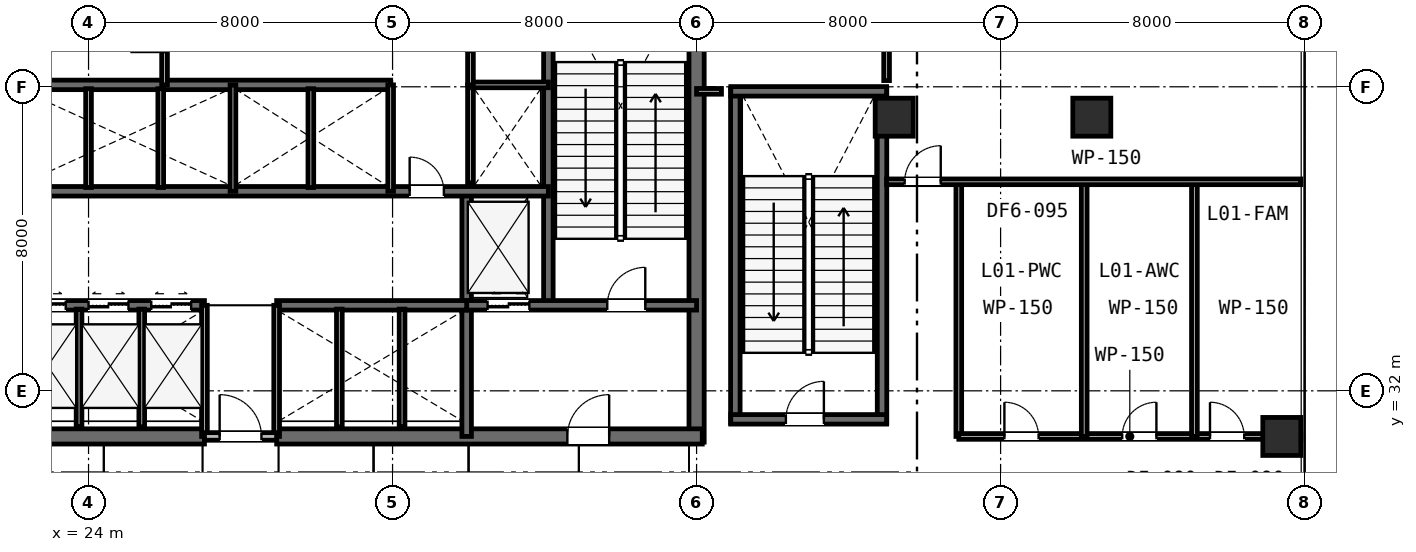
"""IFC4 building model, lengths in metres.
Left out: names, types, materials, properties, quantities, classifications, styles, units other than length and angle.
Written with IfcOpenShell. Run it as: python <this file> out.ifc"""

import sys

from ifc_helpers import new_model, si_unit, direction, frame, frame_2d, origin, origin_2d, place, context, subcontext, project, spatial, rectangle, extrude, element, fill, save


model = new_model("IFC4")
c1 = context("Model", 3, precision=1e-05, world=origin(), true_north=direction((0.0, 1.0)))
c2 = subcontext(c1, "Body", "Model", "MODEL_VIEW")
j1 = project(units=[si_unit("LENGTHUNIT", "METRE"), si_unit("PLANEANGLEUNIT", "RADIAN")], contexts=[c1])
p1 = place(None, origin())
s1 = spatial("IfcSite", under=j1, at=p1, CompositionType="ELEMENT")
p2 = place(p1, origin())
s2 = spatial("IfcBuilding", under=s1, at=p2, CompositionType="ELEMENT")
p3 = place(p2, frame((0.0, 0.0, 6.0)))
s3 = spatial("IfcBuildingStorey", under=s2, at=p3, CompositionType="ELEMENT", Elevation=6.0)
p4 = place(p3, frame((40.0, 30.65, 0.0), z_axis=(0.0, 0.0, 1.0), x_axis=(0.0, 1.0, 0.0)))
e1 = element("IfcWall", 1, at=p4, inside=s3, PredefinedType="SHEAR", context=c2, shape_type="SweptSolid", body=[
    extrude(rectangle(XDim=12.3, YDim=0.4, at=frame_2d((6.15, 0.0))), origin(), (0.0, 0.0, 1.0), 5.1),
])
p5 = place(p3, frame((15.85, 30.8, 0.0), z_axis=(0.0, 0.0, 1.0), x_axis=(1.0, 0.0, 0.0)))
e2 = element("IfcWall", 2, at=p5, inside=s3, PredefinedType="SHEAR", context=c2, shape_type="SweptSolid", body=[
    extrude(rectangle(XDim=11.2, YDim=0.4, at=frame_2d((5.6, 0.0))), origin(), (0.0, 0.0, 1.0), 5.1),
])
p6 = place(p5, frame((2.45, 0.0, 0.0)))
e3 = element("IfcOpeningElement", 3, at=p6, cuts=e2, PredefinedType="OPENING", context=c2, shape_type="SweptSolid", body=[
    extrude(rectangle(XDim=1.1, YDim=2.15, at=frame_2d((0.55, 1.075))), frame((0.0, 0.21, 0.0), z_axis=(0.0, -1.0, 0.0), x_axis=(1.0, 0.0, 0.0)), (0.0, 0.0, 1.0), 0.42),
])
p7 = place(p3, frame((28.95, 30.8, 0.0), z_axis=(0.0, 0.0, 1.0), x_axis=(1.0, 0.0, 0.0)))
e4 = element("IfcWall", 4, at=p7, inside=s3, PredefinedType="SHEAR", context=c2, shape_type="SweptSolid", body=[
    extrude(rectangle(XDim=11.2, YDim=0.4, at=frame_2d((5.6, 0.0))), origin(), (0.0, 0.0, 1.0), 5.1),
])
p8 = place(p7, frame((7.65, 0.0, 0.0)))
e5 = element("IfcOpeningElement", 5, at=p8, cuts=e4, PredefinedType="OPENING", context=c2, shape_type="SweptSolid", body=[
    extrude(rectangle(XDim=1.1, YDim=2.15, at=frame_2d((0.55, 1.075))), frame((0.0, 0.21, 0.0), z_axis=(0.0, -1.0, 0.0), x_axis=(1.0, 0.0, 0.0)), (0.0, 0.0, 1.0), 0.42),
])
p9 = place(p3, frame((36.1, 34.25, 0.0), z_axis=(0.0, 0.0, 1.0), x_axis=(0.0, 1.0, 0.0)))
e6 = element("IfcWall", 6, at=p9, inside=s3, PredefinedType="SHEAR", context=c2, shape_type="SweptSolid", body=[
    extrude(rectangle(XDim=8.65, YDim=0.25, at=frame_2d((4.325, 0.0))), origin(), (0.0, 0.0, 1.0), 5.1),
])
p10 = place(p3, frame((33.95, 30.8, 0.0), z_axis=(0.0, 0.0, 1.0), x_axis=(0.0, 1.0, 0.0)))
e7 = element("IfcWall", 7, at=p10, inside=s3, PredefinedType="SHEAR", context=c2, shape_type="SweptSolid", body=[
    extrude(rectangle(XDim=6.45, YDim=0.25, at=frame_2d((3.225, 0.0))), origin(), (0.0, 0.0, 1.0), 5.1),
])
p11 = place(p3, frame((33.95, 34.25, 0.0), z_axis=(0.0, 0.0, 1.0), x_axis=(1.0, 0.0, 0.0)))
e8 = element("IfcWall", 8, at=p11, inside=s3, PredefinedType="SHEAR", context=c2, shape_type="SweptSolid", body=[
    extrude(rectangle(XDim=6.05, YDim=0.25, at=frame_2d((3.025, 0.0))), origin(), (0.0, 0.0, 1.0), 5.1),
])
p12 = place(p11, frame((3.7, 0.0, 0.0)))
e9 = element("IfcOpeningElement", 9, at=p12, cuts=e8, PredefinedType="OPENING", context=c2, shape_type="SweptSolid", body=[
    extrude(rectangle(XDim=1.0, YDim=2.15, at=frame_2d((0.5, 1.075))), frame((0.0, 0.135, 0.0), z_axis=(0.0, -1.0, 0.0), x_axis=(1.0, 0.0, 0.0)), (0.0, 0.0, 1.0), 0.27),
])
p13 = place(p11, frame((0.55, 0.0, 0.0)))
e10 = element("IfcOpeningElement", 10, at=p13, cuts=e8, PredefinedType="OPENING", context=c2, shape_type="SweptSolid", body=[
    extrude(rectangle(XDim=1.1, YDim=2.15, at=frame_2d((0.55, 1.075))), frame((0.0, 0.135, 0.0), z_axis=(0.0, -1.0, 0.0), x_axis=(1.0, 0.0, 0.0)), (0.0, 0.0, 1.0), 0.27),
])
p14 = place(p3, frame((22.05, 34.25, 0.0), z_axis=(0.0, 0.0, 1.0), x_axis=(1.0, 0.0, 0.0)))
e11 = element("IfcWall", 11, at=p14, inside=s3, PredefinedType="SHEAR", context=c2, shape_type="SweptSolid", body=[
    extrude(rectangle(XDim=5.0, YDim=0.25, at=frame_2d((2.5, 0.0))), origin(), (0.0, 0.0, 1.0), 5.1),
])
p15 = place(p14, frame((0.3, 0.0, 0.0)))
e12 = element("IfcOpeningElement", 12, at=p15, cuts=e11, PredefinedType="OPENING", context=c2, shape_type="SweptSolid", body=[
    extrude(rectangle(XDim=1.05, YDim=2.15, at=frame_2d((0.525, 1.075))), frame((0.0, 0.135, 0.0), z_axis=(0.0, -1.0, 0.0), x_axis=(1.0, 0.0, 0.0)), (0.0, 0.0, 1.0), 0.27),
])
p16 = place(p14, frame((1.95, 0.0, 0.0)))
e13 = element("IfcOpeningElement", 13, at=p16, cuts=e11, PredefinedType="OPENING", context=c2, shape_type="SweptSolid", body=[
    extrude(rectangle(XDim=1.05, YDim=2.15, at=frame_2d((0.525, 1.075))), frame((0.0, 0.135, 0.0), z_axis=(0.0, -1.0, 0.0), x_axis=(1.0, 0.0, 0.0)), (0.0, 0.0, 1.0), 0.27),
])
p17 = place(p14, frame((3.6, 0.0, 0.0)))
e14 = element("IfcOpeningElement", 14, at=p17, cuts=e11, PredefinedType="OPENING", context=c2, shape_type="SweptSolid", body=[
    extrude(rectangle(XDim=1.05, YDim=2.15, at=frame_2d((0.525, 1.075))), frame((0.0, 0.135, 0.0), z_axis=(0.0, -1.0, 0.0), x_axis=(1.0, 0.0, 0.0)), (0.0, 0.0, 1.0), 0.27),
])
p18 = place(p3, frame((28.95, 34.25, 0.0), z_axis=(0.0, 0.0, 1.0), x_axis=(1.0, 0.0, 0.0)))
e15 = element("IfcWall", 15, at=p18, inside=s3, PredefinedType="SHEAR", context=c2, shape_type="SweptSolid", body=[
    extrude(rectangle(XDim=5.0, YDim=0.25, at=frame_2d((2.5, 0.0))), origin(), (0.0, 0.0, 1.0), 5.1),
])
p19 = place(p3, frame((19.9, 37.25, 0.0), z_axis=(0.0, 0.0, 1.0), x_axis=(1.0, 0.0, 0.0)))
e16 = element("IfcWall", 16, at=p19, inside=s3, PredefinedType="SHEAR", context=c2, shape_type="SweptSolid", body=[
    extrude(rectangle(XDim=16.2, YDim=0.25, at=frame_2d((8.1, 0.0))), origin(), (0.0, 0.0, 1.0), 5.1),
])
p20 = place(p19, frame((12.55, 0.0, 0.0)))
e17 = element("IfcOpeningElement", 17, at=p20, cuts=e16, PredefinedType="OPENING", context=c2, shape_type="SweptSolid", body=[
    extrude(rectangle(XDim=0.9, YDim=2.15, at=frame_2d((0.45, 1.075))), frame((0.0, 0.135, 0.0), z_axis=(0.0, -1.0, 0.0), x_axis=(1.0, 0.0, 0.0)), (0.0, 0.0, 1.0), 0.27),
])
p21 = place(p3, frame((19.9, 40.05, 0.0), z_axis=(0.0, 0.0, 1.0), x_axis=(1.0, 0.0, 0.0)))
e18 = element("IfcWall", 18, at=p21, inside=s3, PredefinedType="SHEAR", context=c2, shape_type="SweptSolid", body=[
    extrude(rectangle(XDim=12.05, YDim=0.25, at=frame_2d((6.025, 0.0))), origin(), (0.0, 0.0, 1.0), 5.1),
])
for number, where, z_axis, x_axis in (
    (19, (41.02, 31.15, 0.0), (0.0, 0.0, 1.0), (0.0, 1.0, 0.0)),
    (20, (44.88, 31.15, 0.0), (0.0, 0.0, 1.0), (0.0, 1.0, 0.0)),
):
    element("IfcWall", number, at=place(p3, frame(where, z_axis=z_axis, x_axis=x_axis)), inside=s3, PredefinedType="SHEAR", context=c2, shape_type="SweptSolid", body=[
        extrude(rectangle(XDim=8.8, YDim=0.25, at=frame_2d((4.4, 0.0))), origin(), (0.0, 0.0, 1.0), 5.1),
    ])
p22 = place(p3, frame((40.9, 39.88, 0.0), z_axis=(0.0, 0.0, 1.0), x_axis=(1.0, 0.0, 0.0)))
e21 = element("IfcWall", 21, at=p22, inside=s3, PredefinedType="SHEAR", context=c2, shape_type="SweptSolid", body=[
    extrude(rectangle(XDim=4.1, YDim=0.25, at=frame_2d((2.05, 0.0))), origin(), (0.0, 0.0, 1.0), 5.1),
])
p23 = place(p3, frame((40.9, 31.25, 0.0), z_axis=(0.0, 0.0, 1.0), x_axis=(1.0, 0.0, 0.0)))
e22 = element("IfcWall", 22, at=p23, inside=s3, PredefinedType="SHEAR", context=c2, shape_type="SweptSolid", body=[
    extrude(rectangle(XDim=4.1, YDim=0.25, at=frame_2d((2.05, 0.0))), origin(), (0.0, 0.0, 1.0), 5.1),
])
p24 = place(p23, frame((1.45, 0.0, 0.0)))
e23 = element("IfcOpeningElement", 23, at=p24, cuts=e22, PredefinedType="OPENING", context=c2, shape_type="SweptSolid", body=[
    extrude(rectangle(XDim=1.0, YDim=2.15, at=frame_2d((0.5, 1.075))), frame((0.0, 0.135, 0.0), z_axis=(0.0, -1.0, 0.0), x_axis=(1.0, 0.0, 0.0)), (0.0, 0.0, 1.0), 0.27),
])
for number, where, z_axis, x_axis in (
    (24, (45.2, 39.2, 0.0), (0.0, 0.0, 1.0), (1.0, 0.0, 0.0)),
    (25, (50.4, 39.2, 0.0), (0.0, 0.0, 1.0), (1.0, 0.0, 0.0)),
    (26, (55.4, 30.8, 0.0), (0.0, 0.0, 1.0), (1.0, 0.0, 0.0)),
):
    element("IfcColumn", number, at=place(p3, frame(where, z_axis=z_axis, x_axis=x_axis)), inside=s3, PredefinedType="COLUMN", context=c2, shape_type="SweptSolid", body=[
        extrude(rectangle(XDim=1.0, YDim=1.0, at=origin_2d()), origin(), (0.0, 0.0, 1.0), 5.1),
    ])
for number, where, z_axis, x_axis in (
    (27, (27.05, 30.8, 0.0), (0.0, 0.0, 1.0), (0.0, 1.0, 0.0)),
    (28, (28.95, 30.8, 0.0), (0.0, 0.0, 1.0), (0.0, 1.0, 0.0)),
):
    element("IfcWall", number, at=place(p3, frame(where, z_axis=z_axis, x_axis=x_axis)), inside=s3, PredefinedType="PLUMBINGWALL", context=c2, shape_type="SweptSolid", body=[
        extrude(rectangle(XDim=3.45, YDim=0.15, at=frame_2d((1.725, 0.0))), origin(), (0.0, 0.0, 1.0), 4.51),
    ])
p25 = place(p3, frame((27.05, 30.8, 0.0), z_axis=(0.0, 0.0, 1.0), x_axis=(1.0, 0.0, 0.0)))
e29 = element("IfcWall", 29, at=p25, inside=s3, PredefinedType="PARTITIONING", context=c2, shape_type="SweptSolid", body=[
    extrude(rectangle(XDim=1.9, YDim=0.2, at=frame_2d((0.95, 0.0))), origin(), (0.0, 0.0, 1.0), 4.51),
])
p26 = place(p25, frame((0.4, 0.0, 0.0)))
e30 = element("IfcOpeningElement", 30, at=p26, cuts=e29, PredefinedType="OPENING", context=c2, shape_type="SweptSolid", body=[
    extrude(rectangle(XDim=1.1, YDim=2.15, at=frame_2d((0.55, 1.075))), frame((0.0, 0.11, 0.0), z_axis=(0.0, -1.0, 0.0), x_axis=(1.0, 0.0, 0.0)), (0.0, 0.0, 1.0), 0.22),
])
for number, where, z_axis, x_axis in (
    (31, (23.75, 31.05, 0.0), (0.0, 0.0, 1.0), (0.0, 1.0, 0.0)),
    (32, (25.4, 31.05, 0.0), (0.0, 0.0, 1.0), (0.0, 1.0, 0.0)),
    (33, (30.6, 31.05, 0.0), (0.0, 0.0, 1.0), (0.0, 1.0, 0.0)),
    (34, (32.25, 31.05, 0.0), (0.0, 0.0, 1.0), (0.0, 1.0, 0.0)),
):
    element("IfcWall", number, at=place(p3, frame(where, z_axis=z_axis, x_axis=x_axis)), inside=s3, PredefinedType="PLUMBINGWALL", context=c2, shape_type="SweptSolid", body=[
        extrude(rectangle(XDim=3.1, YDim=0.15, at=frame_2d((1.55, 0.0))), origin(), (0.0, 0.0, 1.0), 4.77),
    ])
p27 = place(p3, frame((27.8, 37.25, 0.0), z_axis=(0.0, 0.0, 1.0), x_axis=(0.0, 1.0, 0.0)))
e35 = element("IfcWall", 35, at=p27, inside=s3, PredefinedType="PLUMBINGWALL", context=c2, shape_type="SweptSolid", body=[
    extrude(rectangle(XDim=2.8, YDim=0.15, at=frame_2d((1.4, 0.0))), origin(), (0.0, 0.0, 1.0), 4.77),
])
for number, where, z_axis, x_axis in (
    (36, (24.0, 37.35, 0.0), (0.0, 0.0, 1.0), (0.0, 1.0, 0.0)),
    (37, (25.9, 37.35, 0.0), (0.0, 0.0, 1.0), (0.0, 1.0, 0.0)),
):
    element("IfcWall", number, at=place(p3, frame(where, z_axis=z_axis, x_axis=x_axis)), inside=s3, PredefinedType="PLUMBINGWALL", context=c2, shape_type="SweptSolid", body=[
        extrude(rectangle(XDim=2.6, YDim=0.15, at=frame_2d((1.3, 0.0))), origin(), (0.0, 0.0, 1.0), 4.77),
    ])
p28 = place(p3, frame((31.95, 37.25, 0.0), z_axis=(0.0, 0.0, 1.0), x_axis=(0.0, 1.0, 0.0)))
e38 = element("IfcWall", 38, at=p28, inside=s3, PredefinedType="PLUMBINGWALL", context=c2, shape_type="SweptSolid", body=[
    extrude(rectangle(XDim=2.8, YDim=0.15, at=frame_2d((1.4, 0.0))), origin(), (0.0, 0.0, 1.0), 4.77),
])
p29 = place(p3, frame((29.85, 37.35, 0.0), z_axis=(0.0, 0.0, 1.0), x_axis=(0.0, 1.0, 0.0)))
e39 = element("IfcWall", 39, at=p29, inside=s3, PredefinedType="PLUMBINGWALL", context=c2, shape_type="SweptSolid", body=[
    extrude(rectangle(XDim=2.6, YDim=0.15, at=frame_2d((1.3, 0.0))), origin(), (0.0, 0.0, 1.0), 4.77),
])
p30 = place(p3, frame((34.05, 37.473, 0.0), z_axis=(0.0, 0.0, 1.0), x_axis=(0.0, 1.0, 0.0)))
e40 = element("IfcWall", 40, at=p30, inside=s3, PredefinedType="PLUMBINGWALL", context=c2, shape_type="SweptSolid", body=[
    extrude(rectangle(XDim=2.577, YDim=0.15, at=frame_2d((1.288, 0.0))), origin(), (0.0, 0.0, 1.0), 4.77),
])
p31 = place(p3, frame((34.05, 40.05, 0.0), z_axis=(0.0, 0.0, 1.0), x_axis=(1.0, 0.0, 0.0)))
e41 = element("IfcWall", 41, at=p31, inside=s3, PredefinedType="PARTITIONING", context=c2, shape_type="SweptSolid", body=[
    extrude(rectangle(XDim=2.05, YDim=0.15, at=frame_2d((1.025, 0.0))), origin(), (0.0, 0.0, 1.0), 4.77),
])
p32 = place(p3, frame((34.05, 40.05, 0.0), z_axis=(0.0, 0.0, 1.0), x_axis=(0.0, 1.0, 0.0)))
e42 = element("IfcWall", 42, at=p32, inside=s3, PredefinedType="PARTITIONING", context=c2, shape_type="SweptSolid", body=[
    extrude(rectangle(XDim=2.63, YDim=0.15, at=frame_2d((1.315, 0.0))), origin(), (0.0, 0.0, 1.0), 4.77),
])
p33 = place(p32, frame((0.865, 0.0, 0.0)))
e43 = element("IfcOpeningElement", 43, at=p33, cuts=e42, PredefinedType="OPENING", context=c2, shape_type="SweptSolid", body=[
    extrude(rectangle(XDim=0.9, YDim=2.15, at=frame_2d((0.45, 1.075))), frame((0.0, 0.085, 0.0), z_axis=(0.0, -1.0, 0.0), x_axis=(1.0, 0.0, 0.0)), (0.0, 0.0, 1.0), 0.17),
])
p34 = place(p3, frame((26.0, 40.05, 0.0), z_axis=(0.0, 0.0, 1.0), x_axis=(0.0, 1.0, 0.0)))
e44 = element("IfcWall", 44, at=p34, inside=s3, PredefinedType="PARTITIONING", context=c2, shape_type="SweptSolid", body=[
    extrude(rectangle(XDim=2.63, YDim=0.15, at=frame_2d((1.315, 0.0))), origin(), (0.0, 0.0, 1.0), 4.77),
])
p35 = place(p34, frame((0.865, 0.0, 0.0)))
e45 = element("IfcOpeningElement", 45, at=p35, cuts=e44, PredefinedType="OPENING", context=c2, shape_type="SweptSolid", body=[
    extrude(rectangle(XDim=0.9, YDim=2.15, at=frame_2d((0.45, 1.075))), frame((0.0, 0.085, 0.0), z_axis=(0.0, -1.0, 0.0), x_axis=(1.0, 0.0, 0.0)), (0.0, 0.0, 1.0), 0.17),
])
p36 = place(p3, frame((46.9, 30.8, 0.0), z_axis=(0.0, 0.0, 1.0), x_axis=(0.0, 1.0, 0.0)))
e46 = element("IfcWall", 46, at=p36, inside=s3, PredefinedType="PARTITIONING", context=c2, shape_type="SweptSolid", body=[
    extrude(rectangle(XDim=6.7, YDim=0.15, at=frame_2d((3.35, 0.0))), origin(), (0.0, 0.0, 1.0), 4.12),
])
p37 = place(p3, frame((46.9, 30.8, 0.0), z_axis=(0.0, 0.0, 1.0), x_axis=(1.0, 0.0, 0.0)))
e47 = element("IfcWall", 47, at=p37, inside=s3, PredefinedType="PARTITIONING", context=c2, shape_type="SweptSolid", body=[
    extrude(rectangle(XDim=9.0, YDim=0.15, at=frame_2d((4.5, 0.0))), origin(), (0.0, 0.0, 1.0), 4.12),
])
p38 = place(p37, frame((1.2, 0.0, 0.0)))
e48 = element("IfcOpeningElement", 48, at=p38, cuts=e47, PredefinedType="OPENING", context=c2, shape_type="SweptSolid", body=[
    extrude(rectangle(XDim=0.9, YDim=2.15, at=frame_2d((0.45, 1.075))), frame((0.0, 0.085, 0.0), z_axis=(0.0, -1.0, 0.0), x_axis=(1.0, 0.0, 0.0)), (0.0, 0.0, 1.0), 0.17),
])
p39 = place(p37, frame((4.3, 0.0, 0.0)))
e49 = element("IfcOpeningElement", 49, at=p39, cuts=e47, PredefinedType="OPENING", context=c2, shape_type="SweptSolid", body=[
    extrude(rectangle(XDim=0.9, YDim=2.15, at=frame_2d((0.45, 1.075))), frame((0.0, 0.085, 0.0), z_axis=(0.0, -1.0, 0.0), x_axis=(1.0, 0.0, 0.0)), (0.0, 0.0, 1.0), 0.17),
])
p40 = place(p37, frame((6.61, 0.0, 0.0)))
e50 = element("IfcOpeningElement", 50, at=p40, cuts=e47, PredefinedType="OPENING", context=c2, shape_type="SweptSolid", body=[
    extrude(rectangle(XDim=0.9, YDim=2.15, at=frame_2d((0.45, 1.075))), frame((0.0, 0.085, 0.0), z_axis=(0.0, -1.0, 0.0), x_axis=(1.0, 0.0, 0.0)), (0.0, 0.0, 1.0), 0.17),
])
for number, where, z_axis, x_axis in (
    (51, (50.2, 30.8, 0.0), (0.0, 0.0, 1.0), (0.0, 1.0, 0.0)),
    (52, (53.1, 30.8, 0.0), (0.0, 0.0, 1.0), (0.0, 1.0, 0.0)),
):
    element("IfcWall", number, at=place(p3, frame(where, z_axis=z_axis, x_axis=x_axis)), inside=s3, PredefinedType="PARTITIONING", context=c2, shape_type="SweptSolid", body=[
        extrude(rectangle(XDim=6.7, YDim=0.15, at=frame_2d((3.35, 0.0))), origin(), (0.0, 0.0, 1.0), 4.12),
    ])
p41 = place(p3, frame((45.0, 37.5, 0.0), z_axis=(0.0, 0.0, 1.0), x_axis=(1.0, 0.0, 0.0)))
e53 = element("IfcWall", 53, at=p41, inside=s3, PredefinedType="PARTITIONING", context=c2, shape_type="SweptSolid", body=[
    extrude(rectangle(XDim=10.9, YDim=0.15, at=frame_2d((5.45, 0.0))), origin(), (0.0, 0.0, 1.0), 4.12),
])
p42 = place(p41, frame((0.475, 0.0, 0.0)))
e54 = element("IfcOpeningElement", 54, at=p42, cuts=e53, PredefinedType="OPENING", context=c2, shape_type="SweptSolid", body=[
    extrude(rectangle(XDim=0.95, YDim=2.15, at=frame_2d((0.475, 1.075))), frame((0.0, 0.085, 0.0), z_axis=(0.0, -1.0, 0.0), x_axis=(1.0, 0.0, 0.0)), (0.0, 0.0, 1.0), 0.17),
])
p43 = place(p3, frame((45.0, 40.163, 0.0), z_axis=(0.0, 0.0, 1.0), x_axis=(0.0, 1.0, 0.0)))
e55 = element("IfcWall", 55, at=p43, inside=s3, PredefinedType="PARTITIONING", context=c2, shape_type="SweptSolid", body=[
    extrude(rectangle(XDim=7.737, YDim=0.15, at=frame_2d((3.868, 0.0))), origin(), (0.0, 0.0, 1.0), 4.31),
])
p44 = place(p3, frame((40.0, 39.88, 0.0), z_axis=(0.0, 0.0, 1.0), x_axis=(1.0, 0.0, 0.0)))
e56 = element("IfcWall", 56, at=p44, inside=s3, PredefinedType="PARTITIONING", context=c2, shape_type="SweptSolid", body=[
    extrude(rectangle(XDim=0.655, YDim=0.15, at=frame_2d((0.328, 0.0))), origin(), (0.0, 0.0, 1.0), 4.77),
])
p45 = place(p26, origin())
e57 = element("IfcDoor", 57, at=p45, inside=s3, OperationType="SINGLE_SWING_LEFT", PredefinedType="DOOR", context=c2, shape_type="SweptSolid", body=[
    extrude(rectangle(XDim=1.1, YDim=2.15, at=frame_2d((0.55, 1.075))), frame((0.0, 0.025, 0.0), z_axis=(0.0, -1.0, 0.0), x_axis=(1.0, 0.0, 0.0)), (0.0, 0.0, 1.0), 0.05),
])
fill(e30, e57)
p46 = place(p12, origin())
e58 = element("IfcDoor", 58, at=p46, inside=s3, OperationType="SINGLE_SWING_RIGHT", PredefinedType="DOOR", context=c2, shape_type="SweptSolid", body=[
    extrude(rectangle(XDim=1.0, YDim=2.15, at=frame_2d((0.5, 1.075))), frame((0.0, 0.025, 0.0), z_axis=(0.0, -1.0, 0.0), x_axis=(1.0, 0.0, 0.0)), (0.0, 0.0, 1.0), 0.05),
])
fill(e9, e58)
p47 = place(p8, origin())
e59 = element("IfcDoor", 59, at=p47, inside=s3, OperationType="SINGLE_SWING_RIGHT", PredefinedType="DOOR", context=c2, shape_type="SweptSolid", body=[
    extrude(rectangle(XDim=1.1, YDim=2.15, at=frame_2d((0.55, 1.075))), frame((0.0, 0.025, 0.0), z_axis=(0.0, -1.0, 0.0), x_axis=(1.0, 0.0, 0.0)), (0.0, 0.0, 1.0), 0.05),
])
fill(e5, e59)
p48 = place(p24, origin())
e60 = element("IfcDoor", 60, at=p48, inside=s3, OperationType="SINGLE_SWING_RIGHT", PredefinedType="DOOR", context=c2, shape_type="SweptSolid", body=[
    extrude(rectangle(XDim=1.0, YDim=2.15, at=frame_2d((0.5, 1.075))), frame((0.0, 0.025, 0.0), z_axis=(0.0, -1.0, 0.0), x_axis=(1.0, 0.0, 0.0)), (0.0, 0.0, 1.0), 0.05),
])
fill(e23, e60)
p49 = place(p20, origin())
e61 = element("IfcDoor", 61, at=p49, inside=s3, OperationType="SINGLE_SWING_LEFT", PredefinedType="DOOR", context=c2, shape_type="SweptSolid", body=[
    extrude(rectangle(XDim=0.9, YDim=2.15, at=frame_2d((0.45, 1.075))), frame((0.0, 0.025, 0.0), z_axis=(0.0, -1.0, 0.0), x_axis=(1.0, 0.0, 0.0)), (0.0, 0.0, 1.0), 0.05),
])
fill(e17, e61)
p50 = place(p38, origin())
e62 = element("IfcDoor", 62, at=p50, inside=s3, OperationType="SINGLE_SWING_LEFT", PredefinedType="DOOR", context=c2, shape_type="SweptSolid", body=[
    extrude(rectangle(XDim=0.9, YDim=2.15, at=frame_2d((0.45, 1.075))), frame((0.0, 0.025, 0.0), z_axis=(0.0, -1.0, 0.0), x_axis=(1.0, 0.0, 0.0)), (0.0, 0.0, 1.0), 0.05),
])
fill(e48, e62)
p51 = place(p39, origin())
e63 = element("IfcDoor", 63, at=p51, inside=s3, OperationType="SINGLE_SWING_RIGHT", PredefinedType="DOOR", context=c2, shape_type="SweptSolid", body=[
    extrude(rectangle(XDim=0.9, YDim=2.15, at=frame_2d((0.45, 1.075))), frame((0.0, 0.025, 0.0), z_axis=(0.0, -1.0, 0.0), x_axis=(1.0, 0.0, 0.0)), (0.0, 0.0, 1.0), 0.05),
])
fill(e49, e63)
p52 = place(p40, origin())
e64 = element("IfcDoor", 64, at=p52, inside=s3, OperationType="SINGLE_SWING_LEFT", PredefinedType="DOOR", context=c2, shape_type="SweptSolid", body=[
    extrude(rectangle(XDim=0.9, YDim=2.15, at=frame_2d((0.45, 1.075))), frame((0.0, 0.025, 0.0), z_axis=(0.0, -1.0, 0.0), x_axis=(1.0, 0.0, 0.0)), (0.0, 0.0, 1.0), 0.05),
])
fill(e50, e64)
p53 = place(p42, origin())
e65 = element("IfcDoor", 65, at=p53, inside=s3, OperationType="SINGLE_SWING_RIGHT", PredefinedType="DOOR", context=c2, shape_type="SweptSolid", body=[
    extrude(rectangle(XDim=0.95, YDim=2.15, at=frame_2d((0.475, 1.075))), frame((0.0, 0.025, 0.0), z_axis=(0.0, -1.0, 0.0), x_axis=(1.0, 0.0, 0.0)), (0.0, 0.0, 1.0), 0.05),
])
fill(e54, e65)
p54 = place(p13, origin())
e66 = element("IfcDoor", 66, at=p54, inside=s3, OperationType="DOUBLE_DOOR_SLIDING", PredefinedType="DOOR", context=c2, shape_type="SweptSolid", body=[
    extrude(rectangle(XDim=1.1, YDim=2.15, at=frame_2d((0.55, 1.075))), frame((0.0, 0.025, 0.0), z_axis=(0.0, -1.0, 0.0), x_axis=(1.0, 0.0, 0.0)), (0.0, 0.0, 1.0), 0.05),
])
fill(e10, e66)
p55 = place(p15, origin())
e67 = element("IfcDoor", 67, at=p55, inside=s3, OperationType="DOUBLE_DOOR_SLIDING", PredefinedType="DOOR", context=c2, shape_type="SweptSolid", body=[
    extrude(rectangle(XDim=1.05, YDim=2.15, at=frame_2d((0.525, 1.075))), frame((0.0, 0.025, 0.0), z_axis=(0.0, -1.0, 0.0), x_axis=(1.0, 0.0, 0.0)), (0.0, 0.0, 1.0), 0.05),
])
fill(e12, e67)
p56 = place(p16, origin())
e68 = element("IfcDoor", 68, at=p56, inside=s3, OperationType="DOUBLE_DOOR_SLIDING", PredefinedType="DOOR", context=c2, shape_type="SweptSolid", body=[
    extrude(rectangle(XDim=1.05, YDim=2.15, at=frame_2d((0.525, 1.075))), frame((0.0, 0.025, 0.0), z_axis=(0.0, -1.0, 0.0), x_axis=(1.0, 0.0, 0.0)), (0.0, 0.0, 1.0), 0.05),
])
fill(e13, e68)
p57 = place(p17, origin())
e69 = element("IfcDoor", 69, at=p57, inside=s3, OperationType="DOUBLE_DOOR_SLIDING", PredefinedType="DOOR", context=c2, shape_type="SweptSolid", body=[
    extrude(rectangle(XDim=1.05, YDim=2.15, at=frame_2d((0.525, 1.075))), frame((0.0, 0.025, 0.0), z_axis=(0.0, -1.0, 0.0), x_axis=(1.0, 0.0, 0.0)), (0.0, 0.0, 1.0), 0.05),
])
fill(e14, e69)
save(model, sys.argv[1])
